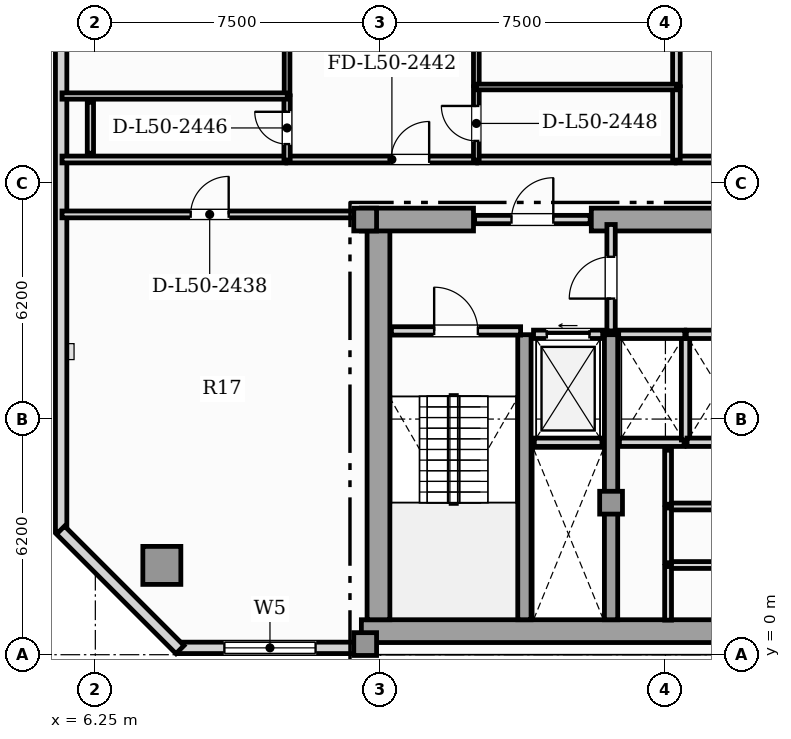
"""IFC4 building model, lengths in metres.
Left out: names, types, materials, properties, quantities, classifications, styles, units other than length and angle.
Written with IfcOpenShell. Run it as: python <this file> out.ifc"""

import sys

from ifc_helpers import new_model, si_unit, direction, frame, frame_2d, origin, origin_2d, place, context, subcontext, project, spatial, rectangle, hollow_rectangle, extrude, element, fill, save


model = new_model("IFC4")
c1 = context("Model", 3, precision=1e-05, world=origin(), true_north=direction((0.0, 1.0)))
c2 = subcontext(c1, "Body", "Model", "MODEL_VIEW")
j1 = project(units=[si_unit("LENGTHUNIT", "METRE"), si_unit("PLANEANGLEUNIT", "RADIAN")], contexts=[c1])
p1 = place(None, origin())
s1 = spatial("IfcSite", under=j1, at=p1, CompositionType="ELEMENT")
p2 = place(p1, origin())
s2 = spatial("IfcBuilding", under=s1, at=p2, CompositionType="ELEMENT")
p3 = place(p2, frame((0.0, 0.0, 204.15)))
s3 = spatial("IfcBuildingStorey", under=s2, at=p3, CompositionType="ELEMENT", Elevation=204.15)
p4 = place(p3, frame((13.25, 0.62, 0.0), z_axis=(0.0, 0.0, 1.0), x_axis=(1.0, 0.0, 0.0)))
e1 = element("IfcWall", 1, at=p4, inside=s3, PredefinedType="SHEAR", context=c2, shape_type="SweptSolid", body=[
    extrude(rectangle(XDim=31.0, YDim=0.6, at=frame_2d((15.5, 0.0))), origin(), (0.0, 0.0, 1.0), 3.63),
])
p5 = place(p3, frame((13.7, 0.92, 0.0), z_axis=(0.0, 0.0, 1.0), x_axis=(0.0, 1.0, 0.0)))
e2 = element("IfcWall", 2, at=p5, inside=s3, PredefinedType="SHEAR", context=c2, shape_type="SweptSolid", body=[
    extrude(rectangle(XDim=10.53, YDim=0.6, at=frame_2d((5.265, 0.0))), origin(), (0.0, 0.0, 1.0), 3.63),
])
p6 = place(p3, frame((13.25, 11.45, 0.0), z_axis=(0.0, 0.0, 1.0), x_axis=(1.0, 0.0, 0.0)))
e3 = element("IfcWall", 3, at=p6, inside=s3, PredefinedType="SHEAR", context=c2, shape_type="SweptSolid", body=[
    extrude(rectangle(XDim=2.95, YDim=0.6, at=frame_2d((1.475, 0.0))), origin(), (0.0, 0.0, 1.0), 3.63),
])
p7 = place(p3, frame((19.3, 11.45, 0.0), z_axis=(0.0, 0.0, 1.0), x_axis=(1.0, 0.0, 0.0)))
e4 = element("IfcWall", 4, at=p7, inside=s3, PredefinedType="SHEAR", context=c2, shape_type="SweptSolid", body=[
    extrude(rectangle(XDim=7.3, YDim=0.6, at=frame_2d((3.65, 0.0))), origin(), (0.0, 0.0, 1.0), 3.63),
])
for number, where, z_axis, x_axis in (
    (5, (17.54, 0.92, 0.0), (0.0, 0.0, 1.0), (0.0, 1.0, 0.0)),
    (6, (19.82, 0.92, 0.0), (0.0, 0.0, 1.0), (0.0, 1.0, 0.0)),
):
    element("IfcWall", number, at=place(p3, frame(where, z_axis=z_axis, x_axis=x_axis)), inside=s3, PredefinedType="SHEAR", context=c2, shape_type="SweptSolid", body=[
        extrude(rectangle(XDim=7.5, YDim=0.35, at=frame_2d((3.75, 0.0))), origin(), (0.0, 0.0, 1.0), 3.63),
    ])
for number, where, z_axis, x_axis in (
    (7, (13.35, 0.28, 0.0), (0.0, 0.0, 1.0), (1.0, 0.0, 0.0)),
    (8, (13.35, 11.45, 0.0), (0.0, 0.0, 1.0), (1.0, 0.0, 0.0)),
    (9, (19.82, 4.0, 0.0), (0.0, 0.0, 1.0), (1.0, 0.0, 0.0)),
):
    element("IfcColumn", number, at=place(p3, frame(where, z_axis=z_axis, x_axis=x_axis)), inside=s3, PredefinedType="COLUMN", context=c2, shape_type="SweptSolid", body=[
        extrude(rectangle(XDim=0.6, YDim=0.6, at=origin_2d()), origin(), (0.0, 0.0, 1.0), 3.85),
    ])
p8 = place(p3, frame((8.0, 2.35, 0.0), z_axis=(0.0, 0.0, 1.0), x_axis=(1.0, 0.0, 0.0)))
e10 = element("IfcColumn", 10, at=p8, inside=s3, PredefinedType="USERDEFINED", context=c2, shape_type="SweptSolid", body=[
    extrude(hollow_rectangle(XDim=1.0, YDim=1.0, WallThickness=0.06, at=origin_2d()), origin(), (0.0, 0.0, 1.0), 3.85),
])
p9 = place(p3, frame((8.44, 0.18, 0.0), z_axis=(0.0, 0.0, 1.0), x_axis=(1.0, 0.0, 0.0)))
e11 = element("IfcWall", 11, at=p9, inside=s3, PredefinedType="SOLIDWALL", context=c2, shape_type="SweptSolid", body=[
    extrude(rectangle(XDim=4.81, YDim=0.3, at=frame_2d((2.405, 0.0))), origin(), (0.0, 0.0, 1.0), 3.63),
])
p10 = place(p9, frame((1.205, 0.0, 0.85)))
e12 = element("IfcOpeningElement", 12, at=p10, cuts=e11, PredefinedType="OPENING", context=c2, shape_type="SweptSolid", body=[
    extrude(rectangle(XDim=2.4, YDim=2.0, at=frame_2d((1.2, 1.0))), frame((0.0, 0.16, 0.0), z_axis=(0.0, -1.0, 0.0), x_axis=(1.0, 0.0, 0.0)), (0.0, 0.0, 1.0), 0.32),
])
p11 = place(p3, frame((5.35, 37.16, 0.0), z_axis=(0.0, 0.0, 1.0), x_axis=(0.0, -1.0, 0.0)))
e13 = element("IfcWall", 13, at=p11, inside=s3, PredefinedType="SOLIDWALL", context=c2, shape_type="SweptSolid", body=[
    extrude(rectangle(XDim=33.92, YDim=0.3, at=frame_2d((16.96, 0.0))), origin(), (0.0, 0.0, 1.0), 3.63),
])
p12 = place(p11, frame((2.46, 0.0, 0.95)))
e14 = element("IfcOpeningElement", 14, at=p12, cuts=e13, PredefinedType="OPENING", context=c2, shape_type="SweptSolid", body=[
    extrude(rectangle(XDim=0.9, YDim=1.5, at=frame_2d((0.45, 0.75))), frame((0.0, 0.16, 0.0), z_axis=(0.0, -1.0, 0.0), x_axis=(1.0, 0.0, 0.0)), (0.0, 0.0, 1.0), 0.32),
])
p13 = place(p11, frame((12.31, 0.0, 0.9)))
e15 = element("IfcOpeningElement", 15, at=p13, cuts=e13, PredefinedType="OPENING", context=c2, shape_type="SweptSolid", body=[
    extrude(rectangle(XDim=1.5, YDim=1.95, at=frame_2d((0.75, 0.975))), frame((0.0, 0.16, 0.0), z_axis=(0.0, -1.0, 0.0), x_axis=(1.0, 0.0, 0.0)), (0.0, 0.0, 1.0), 0.32),
])
p14 = place(p3, frame((5.334, 3.278, 0.0), z_axis=(0.0, 0.0, 1.0), x_axis=(0.707106781187, -0.707106781187, 0.0)))
e16 = element("IfcWall", 16, at=p14, inside=s3, PredefinedType="SOLIDWALL", context=c2, shape_type="SweptSolid", body=[
    extrude(rectangle(XDim=4.445, YDim=0.3, at=frame_2d((2.223, 0.0))), origin(), (0.0, 0.0, 1.0), 3.63),
])
p15 = place(p3, frame((17.8, 5.59, 0.0), z_axis=(0.0, 0.0, 1.0), x_axis=(1.0, 0.0, 0.0)))
e17 = element("IfcWall", 17, at=p15, inside=s3, PredefinedType="SOLIDWALL", context=c2, shape_type="SweptSolid", body=[
    extrude(rectangle(XDim=1.78, YDim=0.22, at=frame_2d((0.89, 0.0))), origin(), (0.0, 0.0, 1.0), 3.63),
])
p16 = place(p3, frame((17.78, 8.43, 0.0), z_axis=(0.0, 0.0, 1.0), x_axis=(1.0, 0.0, 0.0)))
e18 = element("IfcWall", 18, at=p16, inside=s3, PredefinedType="SOLIDWALL", context=c2, shape_type="SweptSolid", body=[
    extrude(rectangle(XDim=1.82, YDim=0.22, at=frame_2d((0.91, 0.0))), origin(), (0.0, 0.0, 1.0), 3.63),
])
p17 = place(p16, frame((0.35, 0.0, 0.0)))
e19 = element("IfcOpeningElement", 19, at=p17, cuts=e18, PredefinedType="OPENING", context=c2, shape_type="SweptSolid", body=[
    extrude(rectangle(XDim=1.12, YDim=2.25, at=frame_2d((0.56, 1.125))), frame((0.0, 0.12, 0.0), z_axis=(0.0, -1.0, 0.0), x_axis=(1.0, 0.0, 0.0)), (0.0, 0.0, 1.0), 0.24),
])
p18 = place(p3, frame((20.04, 5.59, 0.0), z_axis=(0.0, 0.0, 1.0), x_axis=(1.0, 0.0, 0.0)))
e20 = element("IfcWall", 20, at=p18, inside=s3, PredefinedType="SOLIDWALL", context=c2, shape_type="SweptSolid", body=[
    extrude(rectangle(XDim=1.7, YDim=0.22, at=frame_2d((0.85, 0.0))), origin(), (0.0, 0.0, 1.0), 3.63),
])
p19 = place(p3, frame((21.78, 5.65, 0.0), z_axis=(0.0, 0.0, 1.0), x_axis=(0.0, 1.0, 0.0)))
e21 = element("IfcWall", 21, at=p19, inside=s3, PredefinedType="SOLIDWALL", context=c2, shape_type="SweptSolid", body=[
    extrude(rectangle(XDim=2.7, YDim=0.22, at=frame_2d((1.35, 0.0))), origin(), (0.0, 0.0, 1.0), 3.63),
])
p20 = place(p3, frame((20.02, 8.43, 0.0), z_axis=(0.0, 0.0, 1.0), x_axis=(1.0, 0.0, 0.0)))
e22 = element("IfcWall", 22, at=p20, inside=s3, PredefinedType="SOLIDWALL", context=c2, shape_type="SweptSolid", body=[
    extrude(rectangle(XDim=1.74, YDim=0.22, at=frame_2d((0.87, 0.0))), origin(), (0.0, 0.0, 1.0), 3.63),
])
p21 = place(p3, frame((21.82, 5.59, 0.0), z_axis=(0.0, 0.0, 1.0), x_axis=(1.0, 0.0, 0.0)))
e23 = element("IfcWall", 23, at=p21, inside=s3, PredefinedType="SOLIDWALL", context=c2, shape_type="SweptSolid", body=[
    extrude(rectangle(XDim=1.7, YDim=0.22, at=frame_2d((0.85, 0.0))), origin(), (0.0, 0.0, 1.0), 3.63),
])
p22 = place(p3, frame((21.8, 8.43, 0.0), z_axis=(0.0, 0.0, 1.0), x_axis=(1.0, 0.0, 0.0)))
e24 = element("IfcWall", 24, at=p22, inside=s3, PredefinedType="SOLIDWALL", context=c2, shape_type="SweptSolid", body=[
    extrude(rectangle(XDim=1.74, YDim=0.22, at=frame_2d((0.87, 0.0))), origin(), (0.0, 0.0, 1.0), 3.63),
])
p23 = place(p3, frame((14.04, 8.52, 0.0), z_axis=(0.0, 0.0, 1.0), x_axis=(1.0, 0.0, 0.0)))
e25 = element("IfcWall", 25, at=p23, inside=s3, PredefinedType="SOLIDWALL", context=c2, shape_type="SweptSolid", body=[
    extrude(rectangle(XDim=3.4, YDim=0.22, at=frame_2d((1.7, 0.0))), origin(), (0.0, 0.0, 1.0), 3.63),
])
p24 = place(p23, frame((1.125, 0.0, 0.0)))
e26 = element("IfcOpeningElement", 26, at=p24, cuts=e25, PredefinedType="OPENING", context=c2, shape_type="SweptSolid", body=[
    extrude(rectangle(XDim=1.15, YDim=2.2, at=frame_2d((0.575, 1.1))), frame((0.0, 0.12, 0.0), z_axis=(0.0, -1.0, 0.0), x_axis=(1.0, 0.0, 0.0)), (0.0, 0.0, 1.0), 0.24),
])
p25 = place(p3, frame((19.82, 8.52, 0.0), z_axis=(0.0, 0.0, 1.0), x_axis=(0.0, 1.0, 0.0)))
e27 = element("IfcWall", 27, at=p25, inside=s3, PredefinedType="SOLIDWALL", context=c2, shape_type="SweptSolid", body=[
    extrude(rectangle(XDim=2.8, YDim=0.22, at=frame_2d((1.4, 0.0))), origin(), (0.0, 0.0, 1.0), 3.086),
])
p26 = place(p25, frame((0.85, 0.0, 0.0)))
e28 = element("IfcOpeningElement", 28, at=p26, cuts=e27, PredefinedType="OPENING", context=c2, shape_type="SweptSolid", body=[
    extrude(rectangle(XDim=1.1, YDim=2.2, at=frame_2d((0.55, 1.1))), frame((0.0, 0.12, 0.0), z_axis=(0.0, -1.0, 0.0), x_axis=(1.0, 0.0, 0.0)), (0.0, 0.0, 1.0), 0.24),
])
p27 = place(p3, frame((16.23, 11.45, 0.0), z_axis=(0.0, 0.0, 1.0), x_axis=(1.0, 0.0, 0.0)))
e29 = element("IfcWall", 29, at=p27, inside=s3, PredefinedType="SOLIDWALL", context=c2, shape_type="SweptSolid", body=[
    extrude(rectangle(XDim=3.04, YDim=0.22, at=frame_2d((1.52, 0.0))), origin(), (0.0, 0.0, 1.0), 3.63),
])
p28 = place(p27, frame((0.97, 0.0, 0.0)))
e30 = element("IfcOpeningElement", 30, at=p28, cuts=e29, PredefinedType="OPENING", context=c2, shape_type="SweptSolid", body=[
    extrude(rectangle(XDim=1.1, YDim=2.2, at=frame_2d((0.55, 1.1))), frame((0.0, 0.12, 0.0), z_axis=(0.0, -1.0, 0.0), x_axis=(1.0, 0.0, 0.0)), (0.0, 0.0, 1.0), 0.24),
])
p29 = place(p3, frame((21.36, 2.36, 0.0), z_axis=(0.0, 0.0, 1.0), x_axis=(1.0, 0.0, 0.0)))
e31 = element("IfcWall", 31, at=p29, inside=s3, PredefinedType="PARTITIONING", context=c2, shape_type="SweptSolid", body=[
    extrude(rectangle(XDim=3.94, YDim=0.18, at=frame_2d((1.97, 0.0))), origin(), (0.0, 0.0, 1.0), 3.63),
])
p30 = place(p3, frame((21.32, 0.91, 0.0), z_axis=(0.0, 0.0, 1.0), x_axis=(0.0, 1.0, 0.0)))
e32 = element("IfcWall", 32, at=p30, inside=s3, PredefinedType="PARTITIONING", context=c2, shape_type="SweptSolid", body=[
    extrude(rectangle(XDim=1.41, YDim=0.18, at=frame_2d((0.705, 0.0))), origin(), (0.0, 0.0, 1.0), 3.63),
])
p31 = place(p3, frame((21.36, 3.9, 0.0), z_axis=(0.0, 0.0, 1.0), x_axis=(1.0, 0.0, 0.0)))
e33 = element("IfcWall", 33, at=p31, inside=s3, PredefinedType="PARTITIONING", context=c2, shape_type="SweptSolid", body=[
    extrude(rectangle(XDim=3.94, YDim=0.18, at=frame_2d((1.97, 0.0))), origin(), (0.0, 0.0, 1.0), 3.63),
])
p32 = place(p3, frame((21.32, 2.42, 0.0), z_axis=(0.0, 0.0, 1.0), x_axis=(0.0, 1.0, 0.0)))
e34 = element("IfcWall", 34, at=p32, inside=s3, PredefinedType="PARTITIONING", context=c2, shape_type="SweptSolid", body=[
    extrude(rectangle(XDim=1.44, YDim=0.18, at=frame_2d((0.72, 0.0))), origin(), (0.0, 0.0, 1.0), 3.63),
])
p33 = place(p3, frame((21.32, 3.96, 0.0), z_axis=(0.0, 0.0, 1.0), x_axis=(0.0, 1.0, 0.0)))
e35 = element("IfcWall", 35, at=p33, inside=s3, PredefinedType="PARTITIONING", context=c2, shape_type="SweptSolid", body=[
    extrude(rectangle(XDim=1.42, YDim=0.18, at=frame_2d((0.71, 0.0))), origin(), (0.0, 0.0, 1.0), 3.63),
])
p34 = place(p3, frame((5.373, 11.585, 0.0), z_axis=(0.0, 0.0, 1.0), x_axis=(1.0, 0.0, 0.0)))
e36 = element("IfcWall", 36, at=p34, inside=s3, PredefinedType="PARTITIONING", context=c2, shape_type="SweptSolid", body=[
    extrude(rectangle(XDim=7.772, YDim=0.18, at=frame_2d((3.886, 0.0))), origin(), (0.0, 0.0, 1.0), 3.63),
])
p35 = place(p34, frame((3.386, 0.0, 0.0)))
e37 = element("IfcOpeningElement", 37, at=p35, cuts=e36, PredefinedType="OPENING", context=c2, shape_type="SweptSolid", body=[
    extrude(rectangle(XDim=1.0, YDim=2.15, at=frame_2d((0.5, 1.075))), frame((0.0, 0.1, 0.0), z_axis=(0.0, -1.0, 0.0), x_axis=(1.0, 0.0, 0.0)), (0.0, 0.0, 1.0), 0.2),
])
p36 = place(p3, frame((21.535, 13.03, 0.0), z_axis=(0.0, 0.0, 1.0), x_axis=(1.0, 0.0, 0.0)))
e38 = element("IfcWall", 38, at=p36, inside=s3, PredefinedType="PARTITIONING", context=c2, shape_type="SweptSolid", body=[
    extrude(rectangle(XDim=11.33, YDim=0.18, at=frame_2d((5.665, 0.0))), origin(), (0.0, 0.0, 1.0), 3.63),
])
p37 = place(p36, frame((3.466, 0.0, 0.0)))
e39 = element("IfcOpeningElement", 39, at=p37, cuts=e38, PredefinedType="OPENING", context=c2, shape_type="SweptSolid", body=[
    extrude(rectangle(XDim=1.0, YDim=2.15, at=frame_2d((0.5, 1.075))), frame((0.0, 0.1, 0.0), z_axis=(0.0, -1.0, 0.0), x_axis=(1.0, 0.0, 0.0)), (0.0, 0.0, 1.0), 0.2),
])
p38 = place(p3, frame((11.29, 13.03, 0.0), z_axis=(0.0, 0.0, 1.0), x_axis=(1.0, 0.0, 0.0)))
e40 = element("IfcWall", 40, at=p38, inside=s3, PredefinedType="PARTITIONING", context=c2, shape_type="SweptSolid", body=[
    extrude(rectangle(XDim=4.99, YDim=0.18, at=frame_2d((2.495, 0.0))), origin(), (0.0, 0.0, 1.0), 3.63),
])
p39 = place(p38, frame((2.743, 0.0, 0.0)))
e41 = element("IfcOpeningElement", 41, at=p39, cuts=e40, PredefinedType="OPENING", context=c2, shape_type="SweptSolid", body=[
    extrude(rectangle(XDim=1.0, YDim=2.15, at=frame_2d((0.5, 1.075))), frame((0.0, 0.1, 0.0), z_axis=(0.0, -1.0, 0.0), x_axis=(1.0, 0.0, 0.0)), (0.0, 0.0, 1.0), 0.2),
])
p40 = place(p3, frame((5.373, 13.03, 0.0), z_axis=(0.0, 0.0, 1.0), x_axis=(1.0, 0.0, 0.0)))
e42 = element("IfcWall", 42, at=p40, inside=s3, PredefinedType="PARTITIONING", context=c2, shape_type="SweptSolid", body=[
    extrude(rectangle(XDim=5.887, YDim=0.18, at=frame_2d((2.944, 0.0))), origin(), (0.0, 0.0, 1.0), 3.63),
])
p41 = place(p3, frame((16.31, 13.03, 0.0), z_axis=(0.0, 0.0, 1.0), x_axis=(1.0, 0.0, 0.0)))
e43 = element("IfcWall", 43, at=p41, inside=s3, PredefinedType="PARTITIONING", context=c2, shape_type="SweptSolid", body=[
    extrude(rectangle(XDim=5.195, YDim=0.18, at=frame_2d((2.597, 0.0))), origin(), (0.0, 0.0, 1.0), 3.63),
])
p42 = place(p3, frame((21.54, 13.015, 0.0), z_axis=(0.0, 0.0, 1.0), x_axis=(0.0, 1.0, 0.0)))
e44 = element("IfcWall", 44, at=p42, inside=s3, PredefinedType="PARTITIONING", context=c2, shape_type="SweptSolid", body=[
    extrude(rectangle(XDim=1.928, YDim=0.2, at=frame_2d((0.964, 0.0))), origin(), (0.0, 0.0, 1.0), 3.63),
])
p43 = place(p3, frame((21.54, 14.973, 0.0), z_axis=(0.0, 0.0, 1.0), x_axis=(0.0, 1.0, 0.0)))
e45 = element("IfcWall", 45, at=p43, inside=s3, PredefinedType="PARTITIONING", context=c2, shape_type="SweptSolid", body=[
    extrude(rectangle(XDim=3.868, YDim=0.2, at=frame_2d((1.934, 0.0))), origin(), (0.0, 0.0, 1.0), 3.63),
])
p44 = place(p3, frame((11.295, 13.015, 0.0), z_axis=(0.0, 0.0, 1.0), x_axis=(0.0, 1.0, 0.0)))
e46 = element("IfcWall", 46, at=p44, inside=s3, PredefinedType="PLUMBINGWALL", context=c2, shape_type="SweptSolid", body=[
    extrude(rectangle(XDim=1.69, YDim=0.165, at=frame_2d((0.845, 0.0))), origin(), (0.0, 0.0, 1.0), 3.63),
])
p45 = place(p44, frame((0.42, 0.0, 0.0)))
e47 = element("IfcOpeningElement", 47, at=p45, cuts=e46, PredefinedType="OPENING", context=c2, shape_type="SweptSolid", body=[
    extrude(rectangle(XDim=0.85, YDim=2.1, at=frame_2d((0.425, 1.05))), frame((0.0, 0.093, 0.0), z_axis=(0.0, -1.0, 0.0), x_axis=(1.0, 0.0, 0.0)), (0.0, 0.0, 1.0), 0.185),
])
p46 = place(p3, frame((11.295, 14.735, 0.0), z_axis=(0.0, 0.0, 1.0), x_axis=(0.0, 1.0, 0.0)))
e48 = element("IfcWall", 48, at=p46, inside=s3, PredefinedType="PARTITIONING", context=c2, shape_type="SweptSolid", body=[
    extrude(rectangle(XDim=8.999, YDim=0.15, at=frame_2d((4.5, 0.0))), origin(), (0.0, 0.0, 1.0), 3.63),
])
p47 = place(p46, frame((4.04, 0.0, 0.0)))
e49 = element("IfcOpeningElement", 49, at=p47, cuts=e48, PredefinedType="OPENING", context=c2, shape_type="SweptSolid", body=[
    extrude(rectangle(XDim=0.92, YDim=2.1, at=frame_2d((0.46, 1.05))), frame((0.0, 0.085, 0.0), z_axis=(0.0, -1.0, 0.0), x_axis=(1.0, 0.0, 0.0)), (0.0, 0.0, 1.0), 0.17),
])
p48 = place(p3, frame((16.275, 13.015, 0.0), z_axis=(0.0, 0.0, 1.0), x_axis=(0.0, 1.0, 0.0)))
e50 = element("IfcWall", 50, at=p48, inside=s3, PredefinedType="PARTITIONING", context=c2, shape_type="SweptSolid", body=[
    extrude(rectangle(XDim=1.928, YDim=0.15, at=frame_2d((0.964, 0.0))), origin(), (0.0, 0.0, 1.0), 3.63),
])
p49 = place(p48, frame((0.504, 0.0, 0.0)))
e51 = element("IfcOpeningElement", 51, at=p49, cuts=e50, PredefinedType="OPENING", context=c2, shape_type="SweptSolid", body=[
    extrude(rectangle(XDim=0.92, YDim=2.1, at=frame_2d((0.46, 1.05))), frame((0.0, 0.085, 0.0), z_axis=(0.0, -1.0, 0.0), x_axis=(1.0, 0.0, 0.0)), (0.0, 0.0, 1.0), 0.17),
])
p50 = place(p3, frame((16.275, 14.973, 0.0), z_axis=(0.0, 0.0, 1.0), x_axis=(0.0, 1.0, 0.0)))
e52 = element("IfcWall", 52, at=p50, inside=s3, PredefinedType="PARTITIONING", context=c2, shape_type="SweptSolid", body=[
    extrude(rectangle(XDim=3.868, YDim=0.15, at=frame_2d((1.934, 0.0))), origin(), (0.0, 0.0, 1.0), 3.63),
])
p51 = place(p50, frame((1.474, 0.0, 0.0)))
e53 = element("IfcOpeningElement", 53, at=p51, cuts=e52, PredefinedType="OPENING", context=c2, shape_type="SweptSolid", body=[
    extrude(rectangle(XDim=0.92, YDim=2.1, at=frame_2d((0.46, 1.05))), frame((0.0, 0.085, 0.0), z_axis=(0.0, -1.0, 0.0), x_axis=(1.0, 0.0, 0.0)), (0.0, 0.0, 1.0), 0.17),
])
p52 = place(p3, frame((5.373, 14.7, 0.0), z_axis=(0.0, 0.0, 1.0), x_axis=(1.0, 0.0, 0.0)))
e54 = element("IfcWall", 54, at=p52, inside=s3, PredefinedType="PLUMBINGWALL", context=c2, shape_type="SweptSolid", body=[
    extrude(rectangle(XDim=5.927, YDim=0.165, at=frame_2d((2.964, 0.0))), origin(), (0.0, 0.0, 1.0), 3.63),
])
p53 = place(p3, frame((16.27, 14.938, 0.0), z_axis=(0.0, 0.0, 1.0), x_axis=(1.0, 0.0, 0.0)))
e55 = element("IfcWall", 55, at=p53, inside=s3, PredefinedType="PARTITIONING", context=c2, shape_type="SweptSolid", body=[
    extrude(rectangle(XDim=5.275, YDim=0.15, at=frame_2d((2.637, 0.0))), origin(), (0.0, 0.0, 1.0), 3.63),
])
p54 = place(p3, frame((6.12, 13.195, 0.0), z_axis=(0.0, 0.0, 1.0), x_axis=(0.0, 1.0, 0.0)))
e56 = element("IfcWall", 56, at=p54, inside=s3, PredefinedType="PLUMBINGWALL", context=c2, shape_type="SweptSolid", body=[
    extrude(rectangle(XDim=1.34, YDim=0.165, at=frame_2d((0.67, 0.0))), origin(), (0.0, 0.0, 1.0), 3.63),
])
p55 = place(p10, origin())
e57 = element("IfcWindow", 57, at=p55, inside=s3, PartitioningType="SINGLE_PANEL", PredefinedType="WINDOW", context=c2, shape_type="SweptSolid", body=[
    extrude(rectangle(XDim=2.4, YDim=2.0, at=frame_2d((1.2, 1.0))), frame((0.0, 0.03, 0.0), z_axis=(0.0, -1.0, 0.0), x_axis=(1.0, 0.0, 0.0)), (0.0, 0.0, 1.0), 0.06),
])
fill(e12, e57)
p56 = place(p17, origin())
e58 = element("IfcDoor", 58, at=p56, inside=s3, OperationType="SLIDING_TO_LEFT", PredefinedType="DOOR", context=c2, shape_type="SweptSolid", body=[
    extrude(rectangle(XDim=1.12, YDim=2.25, at=frame_2d((0.56, 1.125))), frame((0.0, 0.025, 0.0), z_axis=(0.0, -1.0, 0.0), x_axis=(1.0, 0.0, 0.0)), (0.0, 0.0, 1.0), 0.05),
])
fill(e19, e58)
p57 = place(p24, origin())
e59 = element("IfcDoor", 59, at=p57, inside=s3, OperationType="SINGLE_SWING_LEFT", PredefinedType="DOOR", context=c2, shape_type="SweptSolid", body=[
    extrude(rectangle(XDim=1.15, YDim=2.2, at=frame_2d((0.575, 1.1))), frame((0.0, 0.025, 0.0), z_axis=(0.0, -1.0, 0.0), x_axis=(1.0, 0.0, 0.0)), (0.0, 0.0, 1.0), 0.05),
])
fill(e26, e59)
p58 = place(p26, origin())
e60 = element("IfcDoor", 60, at=p58, inside=s3, OperationType="SINGLE_SWING_LEFT", PredefinedType="DOOR", context=c2, shape_type="SweptSolid", body=[
    extrude(rectangle(XDim=1.1, YDim=2.2, at=frame_2d((0.55, 1.1))), frame((0.0, 0.025, 0.0), z_axis=(0.0, -1.0, 0.0), x_axis=(1.0, 0.0, 0.0)), (0.0, 0.0, 1.0), 0.05),
])
fill(e28, e60)
p59 = place(p28, origin())
e61 = element("IfcDoor", 61, at=p59, inside=s3, OperationType="SINGLE_SWING_RIGHT", PredefinedType="DOOR", context=c2, shape_type="SweptSolid", body=[
    extrude(rectangle(XDim=1.1, YDim=2.2, at=frame_2d((0.55, 1.1))), frame((0.0, 0.025, 0.0), z_axis=(0.0, -1.0, 0.0), x_axis=(1.0, 0.0, 0.0)), (0.0, 0.0, 1.0), 0.05),
])
fill(e30, e61)
p60 = place(p35, origin())
e62 = element("IfcDoor", 62, at=p60, inside=s3, OperationType="SINGLE_SWING_RIGHT", PredefinedType="DOOR", context=c2, shape_type="SweptSolid", body=[
    extrude(rectangle(XDim=1.0, YDim=2.15, at=frame_2d((0.5, 1.075))), frame((0.0, 0.025, 0.0), z_axis=(0.0, -1.0, 0.0), x_axis=(1.0, 0.0, 0.0)), (0.0, 0.0, 1.0), 0.05),
])
fill(e37, e62)
p61 = place(p39, origin())
e63 = element("IfcDoor", 63, at=p61, inside=s3, OperationType="SINGLE_SWING_RIGHT", PredefinedType="DOOR", context=c2, shape_type="SweptSolid", body=[
    extrude(rectangle(XDim=1.0, YDim=2.15, at=frame_2d((0.5, 1.075))), frame((0.0, 0.025, 0.0), z_axis=(0.0, -1.0, 0.0), x_axis=(1.0, 0.0, 0.0)), (0.0, 0.0, 1.0), 0.05),
])
fill(e41, e63)
p62 = place(p45, origin())
e64 = element("IfcDoor", 64, at=p62, inside=s3, OperationType="SINGLE_SWING_RIGHT", PredefinedType="DOOR", context=c2, shape_type="SweptSolid", body=[
    extrude(rectangle(XDim=0.85, YDim=2.1, at=frame_2d((0.425, 1.05))), frame((0.0, 0.025, 0.0), z_axis=(0.0, -1.0, 0.0), x_axis=(1.0, 0.0, 0.0)), (0.0, 0.0, 1.0), 0.05),
])
fill(e47, e64)
p63 = place(p49, origin())
e65 = element("IfcDoor", 65, at=p63, inside=s3, OperationType="SINGLE_SWING_RIGHT", PredefinedType="DOOR", context=c2, shape_type="SweptSolid", body=[
    extrude(rectangle(XDim=0.92, YDim=2.1, at=frame_2d((0.46, 1.05))), frame((0.0, 0.025, 0.0), z_axis=(0.0, -1.0, 0.0), x_axis=(1.0, 0.0, 0.0)), (0.0, 0.0, 1.0), 0.05),
])
fill(e51, e65)
save(model, sys.argv[1])
